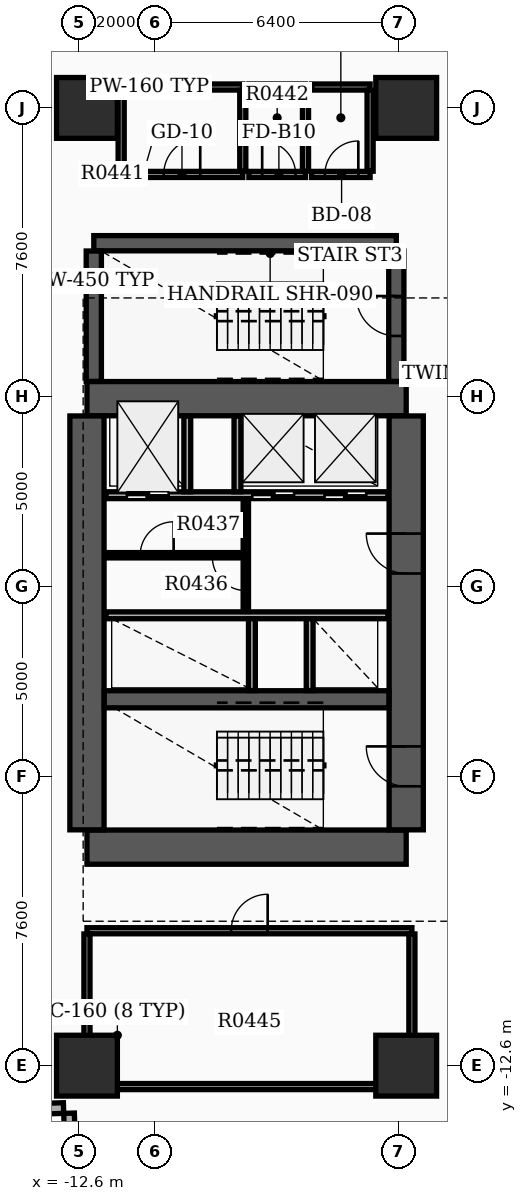
"""IFC4 building model, lengths in metres.
Left out: names, types, materials, properties, quantities, classifications, styles, units other than length and angle.
Written with IfcOpenShell. Run it as: python <this file> out.ifc"""

import sys

from ifc_helpers import new_model, si_unit, direction, frame, frame_2d, origin, origin_2d, place, context, subcontext, project, spatial, rectangle, extrude, element, fill, save


model = new_model("IFC4")
c1 = context("Model", 3, precision=1e-05, world=origin(), true_north=direction((0.0, 1.0)))
c2 = subcontext(c1, "Body", "Model", "MODEL_VIEW")
j1 = project(units=[si_unit("LENGTHUNIT", "METRE"), si_unit("PLANEANGLEUNIT", "RADIAN")], contexts=[c1])
p1 = place(None, origin())
s1 = spatial("IfcSite", under=j1, at=p1, CompositionType="ELEMENT")
p2 = place(p1, origin())
s2 = spatial("IfcBuilding", under=s1, at=p2, CompositionType="ELEMENT")
p3 = place(p2, frame((0.0, 0.0, 31.5)))
s3 = spatial("IfcBuildingStorey", under=s2, at=p3, CompositionType="ELEMENT", Elevation=31.5)
for number, where, z_axis, x_axis in (
    (1, (-12.4, -6.85, 0.0), (0.0, 0.0, 1.0), (1.0, 0.0, 0.0)),
    (2, (-12.4, 4.95, 0.0), (0.0, 0.0, 1.0), (1.0, 0.0, 0.0)),
):
    element("IfcWall", number, at=place(p3, frame(where, z_axis=z_axis, x_axis=x_axis)), inside=s3, PredefinedType="SHEAR", context=c2, shape_type="SweptSolid", body=[
        extrude(rectangle(XDim=8.4, YDim=0.9, at=frame_2d((4.2, 0.0))), origin(), (0.0, 0.0, 1.0), 3.7),
    ])
p4 = place(p3, frame((-12.4, -6.395, 0.0), z_axis=(0.0, 0.0, 1.0), x_axis=(0.0, 1.0, 0.0)))
e3 = element("IfcWall", 3, at=p4, inside=s3, PredefinedType="SHEAR", context=c2, shape_type="SweptSolid", body=[
    extrude(rectangle(XDim=10.89, YDim=0.9, at=frame_2d((5.445, 0.0))), origin(), (0.0, 0.0, 1.0), 3.7),
])
p5 = place(p3, frame((-4.0, -6.395, 0.0), z_axis=(0.0, 0.0, 1.0), x_axis=(0.0, 1.0, 0.0)))
e4 = element("IfcWall", 4, at=p5, inside=s3, PredefinedType="SHEAR", context=c2, shape_type="SweptSolid", body=[
    extrude(rectangle(XDim=10.89, YDim=0.9, at=frame_2d((5.445, 0.0))), origin(), (0.0, 0.0, 1.0), 3.7),
])
p6 = place(p5, frame((1.145, 0.0, 0.0)))
e5 = element("IfcOpeningElement", 5, at=p6, cuts=e4, PredefinedType="OPENING", context=c2, shape_type="SweptSolid", body=[
    extrude(rectangle(XDim=1.05, YDim=2.15, at=frame_2d((0.525, 1.075))), frame((0.0, 0.46, 0.0), z_axis=(0.0, -1.0, 0.0), x_axis=(1.0, 0.0, 0.0)), (0.0, 0.0, 1.0), 0.92),
])
p7 = place(p5, frame((6.745, 0.0, 0.0)))
e6 = element("IfcOpeningElement", 6, at=p7, cuts=e4, PredefinedType="OPENING", context=c2, shape_type="SweptSolid", body=[
    extrude(rectangle(XDim=1.05, YDim=2.15, at=frame_2d((0.525, 1.075))), frame((0.0, 0.46, 0.0), z_axis=(0.0, -1.0, 0.0), x_axis=(1.0, 0.0, 0.0)), (0.0, 0.0, 1.0), 0.92),
])
p8 = place(p3, frame((-11.945, -2.96, 0.0), z_axis=(0.0, 0.0, 1.0), x_axis=(1.0, 0.0, 0.0)))
e7 = element("IfcWall", 7, at=p8, inside=s3, PredefinedType="SHEAR", context=c2, shape_type="SweptSolid", body=[
    extrude(rectangle(XDim=7.49, YDim=0.45, at=frame_2d((3.745, 0.0))), origin(), (0.0, 0.0, 1.0), 3.7),
])
p9 = place(p3, frame((-12.22, 9.04, 0.0), z_axis=(0.0, 0.0, 1.0), x_axis=(1.0, 0.0, 0.0)))
e8 = element("IfcWall", 8, at=p9, inside=s3, PredefinedType="SHEAR", context=c2, shape_type="SweptSolid", body=[
    extrude(rectangle(XDim=7.96, YDim=0.4, at=frame_2d((3.98, 0.0))), origin(), (0.0, 0.0, 1.0), 3.7),
])
p10 = place(p3, frame((-12.22, 5.405, 0.0), z_axis=(0.0, 0.0, 1.0), x_axis=(0.0, 1.0, 0.0)))
e9 = element("IfcWall", 9, at=p10, inside=s3, PredefinedType="SHEAR", context=c2, shape_type="SweptSolid", body=[
    extrude(rectangle(XDim=3.43, YDim=0.4, at=frame_2d((1.715, 0.0))), origin(), (0.0, 0.0, 1.0), 3.7),
])
p11 = place(p3, frame((-4.26, 5.405, 0.0), z_axis=(0.0, 0.0, 1.0), x_axis=(0.0, 1.0, 0.0)))
e10 = element("IfcWall", 10, at=p11, inside=s3, PredefinedType="SHEAR", context=c2, shape_type="SweptSolid", body=[
    extrude(rectangle(XDim=3.43, YDim=0.4, at=frame_2d((1.715, 0.0))), origin(), (0.0, 0.0, 1.0), 3.7),
])
p12 = place(p11, frame((1.195, 0.0, 0.0)))
e11 = element("IfcOpeningElement", 11, at=p12, cuts=e10, PredefinedType="OPENING", context=c2, shape_type="SweptSolid", body=[
    extrude(rectangle(XDim=1.05, YDim=2.15, at=frame_2d((0.525, 1.075))), frame((0.0, 0.21, 0.0), z_axis=(0.0, -1.0, 0.0), x_axis=(1.0, 0.0, 0.0)), (0.0, 0.0, 1.0), 0.42),
])
for number, where, z_axis, x_axis in (
    (12, (-12.4, -12.6, 0.0), (0.0, 0.0, 1.0), (1.0, 0.0, 0.0)),
    (13, (-12.4, 12.6, 0.0), (0.0, 0.0, 1.0), (1.0, 0.0, 0.0)),
    (14, (-4.0, -12.6, 0.0), (0.0, 0.0, 1.0), (1.0, 0.0, 0.0)),
    (15, (-4.0, 12.6, 0.0), (0.0, 0.0, 1.0), (1.0, 0.0, 0.0)),
):
    element("IfcColumn", number, at=place(p3, frame(where, z_axis=z_axis, x_axis=x_axis)), inside=s3, PredefinedType="COLUMN", context=c2, shape_type="SweptSolid", body=[
        extrude(rectangle(XDim=1.6, YDim=1.6, at=origin_2d()), origin(), (0.0, 0.0, 1.0), 3.9),
    ])
p13 = place(p3, frame((-14.235, -13.754, 0.0), z_axis=(0.0, 0.0, 1.0), x_axis=(0.999506398264, 0.031415916822, 0.0)))
e16 = element("IfcWall", 16, at=p13, inside=s3, PredefinedType="STANDARD", context=c2, shape_type="SweptSolid", body=[
    extrude(rectangle(XDim=1.22, YDim=0.28, at=frame_2d((0.61, 0.0))), origin(), (0.0, 0.0, 1.0), 2.91),
])
p14 = place(p3, frame((-12.871, -13.851, 0.0), z_axis=(0.0, 0.0, 1.0), x_axis=(0.031412596484, -0.999506502621, 0.0)))
e17 = element("IfcWall", 17, at=p14, inside=s3, PredefinedType="STANDARD", context=c2, shape_type="SweptSolid", body=[
    extrude(rectangle(XDim=1.5, YDim=0.28, at=frame_2d((0.75, 0.0))), origin(), (0.0, 0.0, 1.0), 2.91),
])
p15 = place(p3, frame((-11.9, 2.41, 0.0), z_axis=(0.0, 0.0, 1.0), x_axis=(1.0, 0.0, 0.0)))
e18 = element("IfcWall", 18, at=p15, inside=s3, PredefinedType="SOLIDWALL", context=c2, shape_type="SweptSolid", body=[
    extrude(rectangle(XDim=7.42, YDim=0.18, at=frame_2d((3.71, 0.0))), origin(), (0.0, 0.0, 1.0), 2.9),
])
p16 = place(p15, frame((0.55, 0.0, 0.0)))
e19 = element("IfcOpeningElement", 19, at=p16, cuts=e18, PredefinedType="OPENING", context=c2, shape_type="SweptSolid", body=[
    extrude(rectangle(XDim=1.1, YDim=2.15, at=frame_2d((0.55, 1.075))), frame((0.0, 0.1, 0.0), z_axis=(0.0, -1.0, 0.0), x_axis=(1.0, 0.0, 0.0)), (0.0, 0.0, 1.0), 0.2),
])
p17 = place(p15, frame((3.85, 0.0, 0.0)))
e20 = element("IfcOpeningElement", 20, at=p17, cuts=e18, PredefinedType="OPENING", context=c2, shape_type="SweptSolid", body=[
    extrude(rectangle(XDim=1.1, YDim=2.15, at=frame_2d((0.55, 1.075))), frame((0.0, 0.1, 0.0), z_axis=(0.0, -1.0, 0.0), x_axis=(1.0, 0.0, 0.0)), (0.0, 0.0, 1.0), 0.2),
])
p18 = place(p15, frame((5.75, 0.0, 0.0)))
e21 = element("IfcOpeningElement", 21, at=p18, cuts=e18, PredefinedType="OPENING", context=c2, shape_type="SweptSolid", body=[
    extrude(rectangle(XDim=1.1, YDim=2.15, at=frame_2d((0.55, 1.075))), frame((0.0, 0.1, 0.0), z_axis=(0.0, -1.0, 0.0), x_axis=(1.0, 0.0, 0.0)), (0.0, 0.0, 1.0), 0.2),
])
p19 = place(p3, frame((-11.9, -0.75, 0.0), z_axis=(0.0, 0.0, 1.0), x_axis=(1.0, 0.0, 0.0)))
e22 = element("IfcWall", 22, at=p19, inside=s3, PredefinedType="SOLIDWALL", context=c2, shape_type="SweptSolid", body=[
    extrude(rectangle(XDim=7.42, YDim=0.18, at=frame_2d((3.71, 0.0))), origin(), (0.0, 0.0, 1.0), 2.9),
])
for number, where, z_axis, x_axis in (
    (23, (-9.76, 2.5, 0.0), (0.0, 0.0, 1.0), (0.0, 1.0, 0.0)),
    (24, (-8.44, 2.5, 0.0), (0.0, 0.0, 1.0), (0.0, 1.0, 0.0)),
):
    element("IfcWall", number, at=place(p3, frame(where, z_axis=z_axis, x_axis=x_axis)), inside=s3, PredefinedType="SOLIDWALL", context=c2, shape_type="SweptSolid", body=[
        extrude(rectangle(XDim=1.99, YDim=0.18, at=frame_2d((0.995, 0.0))), origin(), (0.0, 0.0, 1.0), 2.9),
    ])
for number, where, z_axis, x_axis in (
    (25, (-8.06, -2.73, 0.0), (0.0, 0.0, 1.0), (0.0, 1.0, 0.0)),
    (26, (-6.54, -2.73, 0.0), (0.0, 0.0, 1.0), (0.0, 1.0, 0.0)),
):
    element("IfcWall", number, at=place(p3, frame(where, z_axis=z_axis, x_axis=x_axis)), inside=s3, PredefinedType="SOLIDWALL", context=c2, shape_type="SweptSolid", body=[
        extrude(rectangle(XDim=1.89, YDim=0.18, at=frame_2d((0.945, 0.0))), origin(), (0.0, 0.0, 1.0), 2.9),
    ])
p20 = place(p3, frame((-8.22, -0.65, 0.0), z_axis=(0.0, 0.0, 1.0), x_axis=(0.0, 1.0, 0.0)))
e27 = element("IfcWall", 27, at=p20, inside=s3, PredefinedType="SOLIDWALL", context=c2, shape_type="SweptSolid", body=[
    extrude(rectangle(XDim=2.96, YDim=0.14, at=frame_2d((1.48, 0.0))), origin(), (0.0, 0.0, 1.0), 2.9),
])
p21 = place(p20, frame((0.55, 0.0, 0.0)))
e28 = element("IfcOpeningElement", 28, at=p21, cuts=e27, PredefinedType="OPENING", context=c2, shape_type="SweptSolid", body=[
    extrude(rectangle(XDim=0.88, YDim=2.1, at=frame_2d((0.44, 1.05))), frame((0.0, 0.08, 0.0), z_axis=(0.0, -1.0, 0.0), x_axis=(1.0, 0.0, 0.0)), (0.0, 0.0, 1.0), 0.16),
])
p22 = place(p3, frame((-11.85, 0.83, 0.0), z_axis=(0.0, 0.0, 1.0), x_axis=(1.0, 0.0, 0.0)))
e29 = element("IfcWall", 29, at=p22, inside=s3, PredefinedType="PARTITIONING", context=c2, shape_type="SweptSolid", body=[
    extrude(rectangle(XDim=3.552, YDim=0.14, at=frame_2d((1.776, 0.0))), origin(), (0.0, 0.0, 1.0), 2.9),
])
p23 = place(p22, frame((0.85, 0.0, 0.0)))
e30 = element("IfcOpeningElement", 30, at=p23, cuts=e29, PredefinedType="OPENING", context=c2, shape_type="SweptSolid", body=[
    extrude(rectangle(XDim=0.88, YDim=2.1, at=frame_2d((0.44, 1.05))), frame((0.0, 0.08, 0.0), z_axis=(0.0, -1.0, 0.0), x_axis=(1.0, 0.0, 0.0)), (0.0, 0.0, 1.0), 0.16),
])
p24 = place(p3, frame((-11.5, 10.85, 0.0), z_axis=(0.0, 0.0, 1.0), x_axis=(1.0, 0.0, 0.0)))
e31 = element("IfcWall", 31, at=p24, inside=s3, PredefinedType="PARTITIONING", context=c2, shape_type="SweptSolid", body=[
    extrude(rectangle(XDim=3.2, YDim=0.16, at=frame_2d((1.6, 0.0))), origin(), (0.0, 0.0, 1.0), 2.9),
])
p25 = place(p24, frame((1.12, 0.0, 0.0)))
e32 = element("IfcOpeningElement", 32, at=p25, cuts=e31, PredefinedType="OPENING", context=c2, shape_type="SweptSolid", body=[
    extrude(rectangle(XDim=0.96, YDim=2.15, at=frame_2d((0.48, 1.075))), frame((0.0, 0.09, 0.0), z_axis=(0.0, -1.0, 0.0), x_axis=(1.0, 0.0, 0.0)), (0.0, 0.0, 1.0), 0.18),
])
p26 = place(p3, frame((-11.5, 13.15, 0.0), z_axis=(0.0, 0.0, 1.0), x_axis=(1.0, 0.0, 0.0)))
e33 = element("IfcWall", 33, at=p26, inside=s3, PredefinedType="PARTITIONING", context=c2, shape_type="SweptSolid", body=[
    extrude(rectangle(XDim=3.2, YDim=0.16, at=frame_2d((1.6, 0.0))), origin(), (0.0, 0.0, 1.0), 2.9),
])
for number, where, z_axis, x_axis in (
    (34, (-11.5, 10.935, 0.0), (0.0, 0.0, 1.0), (0.0, 1.0, 0.0)),
    (35, (-8.3, 10.935, 0.0), (0.0, 0.0, 1.0), (0.0, 1.0, 0.0)),
):
    element("IfcWall", number, at=place(p3, frame(where, z_axis=z_axis, x_axis=x_axis)), inside=s3, PredefinedType="PARTITIONING", context=c2, shape_type="SweptSolid", body=[
        extrude(rectangle(XDim=2.13, YDim=0.16, at=frame_2d((1.065, 0.0))), origin(), (0.0, 0.0, 1.0), 2.9),
    ])
p27 = place(p3, frame((-8.14, 10.85, 0.0), z_axis=(0.0, 0.0, 1.0), x_axis=(1.0, 0.0, 0.0)))
e36 = element("IfcWall", 36, at=p27, inside=s3, PredefinedType="PARTITIONING", context=c2, shape_type="SweptSolid", body=[
    extrude(rectangle(XDim=1.49, YDim=0.16, at=frame_2d((0.745, 0.0))), origin(), (0.0, 0.0, 1.0), 2.9),
])
p28 = place(p27, frame((0.35, 0.0, 0.0)))
e37 = element("IfcOpeningElement", 37, at=p28, cuts=e36, PredefinedType="OPENING", context=c2, shape_type="SweptSolid", body=[
    extrude(rectangle(XDim=0.88, YDim=2.1, at=frame_2d((0.44, 1.05))), frame((0.0, 0.09, 0.0), z_axis=(0.0, -1.0, 0.0), x_axis=(1.0, 0.0, 0.0)), (0.0, 0.0, 1.0), 0.18),
])
p29 = place(p3, frame((-8.14, 13.15, 0.0), z_axis=(0.0, 0.0, 1.0), x_axis=(1.0, 0.0, 0.0)))
e38 = element("IfcWall", 38, at=p29, inside=s3, PredefinedType="PARTITIONING", context=c2, shape_type="SweptSolid", body=[
    extrude(rectangle(XDim=1.49, YDim=0.16, at=frame_2d((0.745, 0.0))), origin(), (0.0, 0.0, 1.0), 2.9),
])
p30 = place(p3, frame((-6.65, 10.935, 0.0), z_axis=(0.0, 0.0, 1.0), x_axis=(0.0, 1.0, 0.0)))
e39 = element("IfcWall", 39, at=p30, inside=s3, PredefinedType="PARTITIONING", context=c2, shape_type="SweptSolid", body=[
    extrude(rectangle(XDim=2.13, YDim=0.16, at=frame_2d((1.065, 0.0))), origin(), (0.0, 0.0, 1.0), 2.9),
])
p31 = place(p3, frame((-6.49, 10.85, 0.0), z_axis=(0.0, 0.0, 1.0), x_axis=(1.0, 0.0, 0.0)))
e40 = element("IfcWall", 40, at=p31, inside=s3, PredefinedType="PARTITIONING", context=c2, shape_type="SweptSolid", body=[
    extrude(rectangle(XDim=1.54, YDim=0.16, at=frame_2d((0.77, 0.0))), origin(), (0.0, 0.0, 1.0), 2.9),
])
p32 = place(p31, frame((0.35, 0.0, 0.0)))
e41 = element("IfcOpeningElement", 41, at=p32, cuts=e40, PredefinedType="OPENING", context=c2, shape_type="SweptSolid", body=[
    extrude(rectangle(XDim=0.88, YDim=2.15, at=frame_2d((0.44, 1.075))), frame((0.0, 0.09, 0.0), z_axis=(0.0, -1.0, 0.0), x_axis=(1.0, 0.0, 0.0)), (0.0, 0.0, 1.0), 0.18),
])
p33 = place(p3, frame((-6.49, 13.15, 0.0), z_axis=(0.0, 0.0, 1.0), x_axis=(1.0, 0.0, 0.0)))
e42 = element("IfcWall", 42, at=p33, inside=s3, PredefinedType="PARTITIONING", context=c2, shape_type="SweptSolid", body=[
    extrude(rectangle(XDim=1.54, YDim=0.16, at=frame_2d((0.77, 0.0))), origin(), (0.0, 0.0, 1.0), 2.9),
])
p34 = place(p3, frame((-4.95, 10.935, 0.0), z_axis=(0.0, 0.0, 1.0), x_axis=(0.0, 1.0, 0.0)))
e43 = element("IfcWall", 43, at=p34, inside=s3, PredefinedType="PARTITIONING", context=c2, shape_type="SweptSolid", body=[
    extrude(rectangle(XDim=2.13, YDim=0.16, at=frame_2d((1.065, 0.0))), origin(), (0.0, 0.0, 1.0), 2.9),
])
p35 = place(p3, frame((-12.4, -13.15, 0.0), z_axis=(0.0, 0.0, 1.0), x_axis=(1.0, 0.0, 0.0)))
e44 = element("IfcWall", 44, at=p35, inside=s3, PredefinedType="PARTITIONING", context=c2, shape_type="SweptSolid", body=[
    extrude(rectangle(XDim=8.55, YDim=0.16, at=frame_2d((4.275, 0.0))), origin(), (0.0, 0.0, 1.0), 2.9),
])
p36 = place(p3, frame((-12.4, -9.05, 0.0), z_axis=(0.0, 0.0, 1.0), x_axis=(1.0, 0.0, 0.0)))
e45 = element("IfcWall", 45, at=p36, inside=s3, PredefinedType="PARTITIONING", context=c2, shape_type="SweptSolid", body=[
    extrude(rectangle(XDim=8.55, YDim=0.16, at=frame_2d((4.275, 0.0))), origin(), (0.0, 0.0, 1.0), 2.9),
])
p37 = place(p36, frame((3.795, 0.0, 0.0)))
e46 = element("IfcOpeningElement", 46, at=p37, cuts=e45, PredefinedType="OPENING", context=c2, shape_type="SweptSolid", body=[
    extrude(rectangle(XDim=0.96, YDim=2.15, at=frame_2d((0.48, 1.075))), frame((0.0, 0.09, 0.0), z_axis=(0.0, -1.0, 0.0), x_axis=(1.0, 0.0, 0.0)), (0.0, 0.0, 1.0), 0.18),
])
for number, where, z_axis, x_axis in (
    (47, (-12.4, -13.065, 0.0), (0.0, 0.0, 1.0), (0.0, 1.0, 0.0)),
    (48, (-3.85, -13.065, 0.0), (0.0, 0.0, 1.0), (0.0, 1.0, 0.0)),
):
    element("IfcWall", number, at=place(p3, frame(where, z_axis=z_axis, x_axis=x_axis)), inside=s3, PredefinedType="PARTITIONING", context=c2, shape_type="SweptSolid", body=[
        extrude(rectangle(XDim=3.93, YDim=0.16, at=frame_2d((1.965, 0.0))), origin(), (0.0, 0.0, 1.0), 2.9),
    ])
p38 = place(p6, origin())
e49 = element("IfcDoor", 49, at=p38, inside=s3, OperationType="SINGLE_SWING_RIGHT", PredefinedType="DOOR", context=c2, shape_type="SweptSolid", body=[
    extrude(rectangle(XDim=1.05, YDim=2.15, at=frame_2d((0.525, 1.075))), frame((0.0, 0.025, 0.0), z_axis=(0.0, -1.0, 0.0), x_axis=(1.0, 0.0, 0.0)), (0.0, 0.0, 1.0), 0.05),
])
fill(e5, e49)
p39 = place(p7, origin())
e50 = element("IfcDoor", 50, at=p39, inside=s3, OperationType="SINGLE_SWING_RIGHT", PredefinedType="DOOR", context=c2, shape_type="SweptSolid", body=[
    extrude(rectangle(XDim=1.05, YDim=2.15, at=frame_2d((0.525, 1.075))), frame((0.0, 0.025, 0.0), z_axis=(0.0, -1.0, 0.0), x_axis=(1.0, 0.0, 0.0)), (0.0, 0.0, 1.0), 0.05),
])
fill(e6, e50)
p40 = place(p12, origin())
e51 = element("IfcDoor", 51, at=p40, inside=s3, OperationType="SINGLE_SWING_RIGHT", PredefinedType="DOOR", context=c2, shape_type="SweptSolid", body=[
    extrude(rectangle(XDim=1.05, YDim=2.15, at=frame_2d((0.525, 1.075))), frame((0.0, 0.025, 0.0), z_axis=(0.0, -1.0, 0.0), x_axis=(1.0, 0.0, 0.0)), (0.0, 0.0, 1.0), 0.05),
])
fill(e11, e51)
p41 = place(p16, origin())
e52 = element("IfcDoor", 52, at=p41, inside=s3, OperationType="DOUBLE_DOOR_SLIDING", PredefinedType="DOOR", context=c2, shape_type="SweptSolid", body=[
    extrude(rectangle(XDim=1.1, YDim=2.15, at=frame_2d((0.55, 1.075))), frame((0.0, 0.025, 0.0), z_axis=(0.0, -1.0, 0.0), x_axis=(1.0, 0.0, 0.0)), (0.0, 0.0, 1.0), 0.05),
])
fill(e19, e52)
p42 = place(p17, origin())
e53 = element("IfcDoor", 53, at=p42, inside=s3, OperationType="DOUBLE_DOOR_SLIDING", PredefinedType="DOOR", context=c2, shape_type="SweptSolid", body=[
    extrude(rectangle(XDim=1.1, YDim=2.15, at=frame_2d((0.55, 1.075))), frame((0.0, 0.025, 0.0), z_axis=(0.0, -1.0, 0.0), x_axis=(1.0, 0.0, 0.0)), (0.0, 0.0, 1.0), 0.05),
])
fill(e20, e53)
p43 = place(p18, origin())
e54 = element("IfcDoor", 54, at=p43, inside=s3, OperationType="DOUBLE_DOOR_SLIDING", PredefinedType="DOOR", context=c2, shape_type="SweptSolid", body=[
    extrude(rectangle(XDim=1.1, YDim=2.15, at=frame_2d((0.55, 1.075))), frame((0.0, 0.025, 0.0), z_axis=(0.0, -1.0, 0.0), x_axis=(1.0, 0.0, 0.0)), (0.0, 0.0, 1.0), 0.05),
])
fill(e21, e54)
p44 = place(p21, origin())
e55 = element("IfcDoor", 55, at=p44, inside=s3, OperationType="SINGLE_SWING_RIGHT", PredefinedType="DOOR", context=c2, shape_type="SweptSolid", body=[
    extrude(rectangle(XDim=0.88, YDim=2.1, at=frame_2d((0.44, 1.05))), frame((0.0, 0.025, 0.0), z_axis=(0.0, -1.0, 0.0), x_axis=(1.0, 0.0, 0.0)), (0.0, 0.0, 1.0), 0.05),
])
fill(e28, e55)
p45 = place(p23, origin())
e56 = element("IfcDoor", 56, at=p45, inside=s3, OperationType="SINGLE_SWING_RIGHT", PredefinedType="DOOR", context=c2, shape_type="SweptSolid", body=[
    extrude(rectangle(XDim=0.88, YDim=2.1, at=frame_2d((0.44, 1.05))), frame((0.0, 0.025, 0.0), z_axis=(0.0, -1.0, 0.0), x_axis=(1.0, 0.0, 0.0)), (0.0, 0.0, 1.0), 0.05),
])
fill(e30, e56)
p46 = place(p25, origin())
e57 = element("IfcDoor", 57, at=p46, inside=s3, OperationType="SINGLE_SWING_RIGHT", PredefinedType="DOOR", context=c2, shape_type="SweptSolid", body=[
    extrude(rectangle(XDim=0.96, YDim=2.15, at=frame_2d((0.48, 1.075))), frame((0.0, 0.025, 0.0), z_axis=(0.0, -1.0, 0.0), x_axis=(1.0, 0.0, 0.0)), (0.0, 0.0, 1.0), 0.05),
])
fill(e32, e57)
p47 = place(p28, origin())
e58 = element("IfcDoor", 58, at=p47, inside=s3, OperationType="SINGLE_SWING_LEFT", PredefinedType="DOOR", context=c2, shape_type="SweptSolid", body=[
    extrude(rectangle(XDim=0.88, YDim=2.1, at=frame_2d((0.44, 1.05))), frame((0.0, 0.025, 0.0), z_axis=(0.0, -1.0, 0.0), x_axis=(1.0, 0.0, 0.0)), (0.0, 0.0, 1.0), 0.05),
])
fill(e37, e58)
p48 = place(p32, origin())
e59 = element("IfcDoor", 59, at=p48, inside=s3, OperationType="SINGLE_SWING_RIGHT", PredefinedType="DOOR", context=c2, shape_type="SweptSolid", body=[
    extrude(rectangle(XDim=0.88, YDim=2.15, at=frame_2d((0.44, 1.075))), frame((0.0, 0.025, 0.0), z_axis=(0.0, -1.0, 0.0), x_axis=(1.0, 0.0, 0.0)), (0.0, 0.0, 1.0), 0.05),
])
fill(e41, e59)
p49 = place(p37, origin())
e60 = element("IfcDoor", 60, at=p49, inside=s3, OperationType="SINGLE_SWING_RIGHT", PredefinedType="DOOR", context=c2, shape_type="SweptSolid", body=[
    extrude(rectangle(XDim=0.96, YDim=2.15, at=frame_2d((0.48, 1.075))), frame((0.0, 0.025, 0.0), z_axis=(0.0, -1.0, 0.0), x_axis=(1.0, 0.0, 0.0)), (0.0, 0.0, 1.0), 0.05),
])
fill(e46, e60)
save(model, sys.argv[1])
